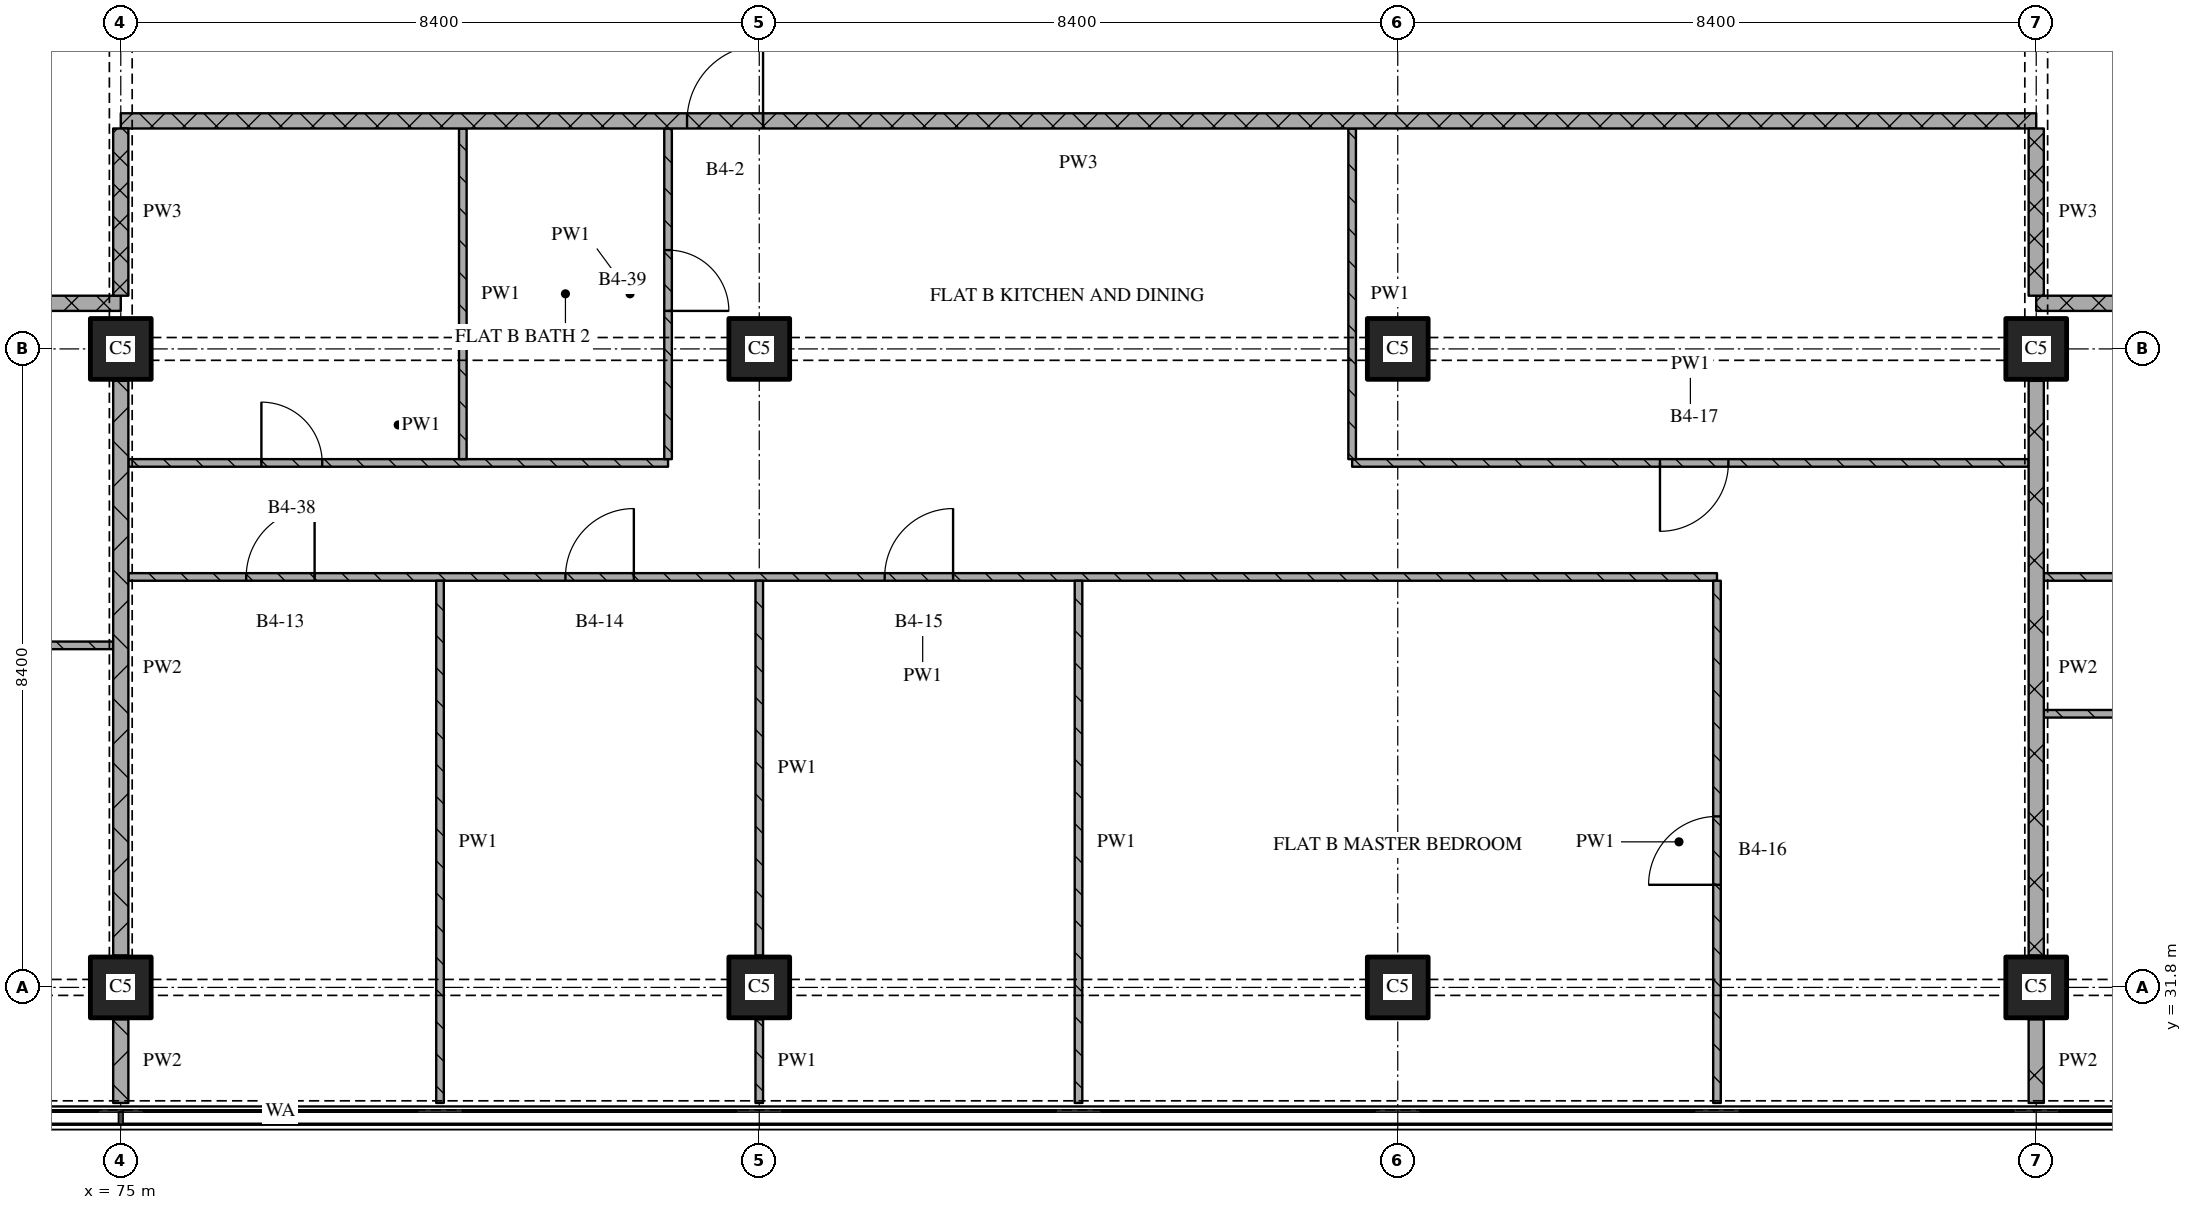
"""IFC4 building model, lengths in metres.
Left out: names, types, materials, properties, quantities, classifications, styles, units other than length and angle.
Written with IfcOpenShell. Run it as: python <this file> out.ifc"""

import sys

from ifc_helpers import new_model, si_unit, direction, frame, frame_2d, origin, origin_2d, place, context, subcontext, project, spatial, rectangle, extrude, element, fill, save


model = new_model("IFC4")
c1 = context("Model", 3, precision=1e-05, world=origin(), true_north=direction((0.0, 1.0)))
c2 = subcontext(c1, "Body", "Model", "MODEL_VIEW")
j1 = project(units=[si_unit("LENGTHUNIT", "METRE"), si_unit("PLANEANGLEUNIT", "RADIAN")], contexts=[c1])
p1 = place(None, origin())
s1 = spatial("IfcSite", under=j1, at=p1, CompositionType="ELEMENT")
p2 = place(p1, origin())
s2 = spatial("IfcBuilding", under=s1, at=p2, CompositionType="ELEMENT")
p3 = place(p2, frame((0.0, 0.0, 134.85)))
s3 = spatial("IfcBuildingStorey", under=s2, at=p3, CompositionType="ELEMENT", Elevation=134.85)
for number, where, z_axis, x_axis in (
    (1, (75.0, 31.8, 0.0), (0.0, 0.0, 1.0), (1.0, 0.0, 0.0)),
    (2, (75.0, 40.2, 0.0), (0.0, 0.0, 1.0), (1.0, 0.0, 0.0)),
    (3, (83.4, 31.8, 0.0), (0.0, 0.0, 1.0), (1.0, 0.0, 0.0)),
    (4, (83.4, 40.2, 0.0), (0.0, 0.0, 1.0), (1.0, 0.0, 0.0)),
    (5, (91.8, 31.8, 0.0), (0.0, 0.0, 1.0), (1.0, 0.0, 0.0)),
    (6, (91.8, 40.2, 0.0), (0.0, 0.0, 1.0), (1.0, 0.0, 0.0)),
    (7, (100.2, 31.8, 0.0), (0.0, 0.0, 1.0), (1.0, 0.0, 0.0)),
    (8, (100.2, 40.2, 0.0), (0.0, 0.0, 1.0), (1.0, 0.0, 0.0)),
):
    element("IfcColumn", number, at=place(p3, frame(where, z_axis=z_axis, x_axis=x_axis)), inside=s3, PredefinedType="COLUMN", context=c2, shape_type="SweptSolid", body=[
        extrude(rectangle(XDim=0.8, YDim=0.8, at=origin_2d()), origin(), (0.0, 0.0, 1.0), 3.6),
    ])
p4 = place(p3, frame((100.3, 35.4, 0.0), z_axis=(0.0, 0.0, 1.0), x_axis=(1.0, 0.0, 0.0)))
e9 = element("IfcWall", 9, at=p4, inside=s3, PredefinedType="PARTITIONING", context=c2, shape_type="SweptSolid", body=[
    extrude(rectangle(XDim=8.3, YDim=0.1, at=frame_2d((4.15, 0.0))), origin(), (0.0, 0.0, 1.0), 3.32),
])
p5 = place(p3, frame((65.7, 36.3, 0.0), z_axis=(0.0, 0.0, 1.0), x_axis=(1.0, 0.0, 0.0)))
e10 = element("IfcWall", 10, at=p5, inside=s3, PredefinedType="PARTITIONING", context=c2, shape_type="SweptSolid", body=[
    extrude(rectangle(XDim=9.2, YDim=0.1, at=frame_2d((4.6, 0.0))), origin(), (0.0, 0.0, 1.0), 3.32),
])
p6 = place(p5, frame((6.5, 0.0, 0.0)))
e11 = element("IfcOpeningElement", 11, at=p6, cuts=e10, PredefinedType="OPENING", context=c2, shape_type="SweptSolid", body=[
    extrude(rectangle(XDim=0.8, YDim=2.1, at=frame_2d((0.4, 1.05))), frame((0.0, 0.06, 0.0), z_axis=(0.0, -1.0, 0.0), x_axis=(1.0, 0.0, 0.0)), (0.0, 0.0, 1.0), 0.12),
])
p7 = place(p3, frame((96.0, 37.2, 0.0), z_axis=(0.0, 0.0, 1.0), x_axis=(-1.0, 0.0, 0.0)))
e12 = element("IfcWall", 12, at=p7, inside=s3, PredefinedType="PARTITIONING", context=c2, shape_type="SweptSolid", body=[
    extrude(rectangle(XDim=20.9, YDim=0.1, at=frame_2d((10.45, 0.0))), origin(), (0.0, 0.0, 1.0), 3.32),
])
p8 = place(p7, frame((10.05, 0.0, 0.0)))
e13 = element("IfcOpeningElement", 13, at=p8, cuts=e12, PredefinedType="OPENING", context=c2, shape_type="SweptSolid", body=[
    extrude(rectangle(XDim=0.9, YDim=2.1, at=frame_2d((0.45, 1.05))), frame((0.0, 0.06, 0.0), z_axis=(0.0, -1.0, 0.0), x_axis=(1.0, 0.0, 0.0)), (0.0, 0.0, 1.0), 0.12),
])
p9 = place(p7, frame((14.25, 0.0, 0.0)))
e14 = element("IfcOpeningElement", 14, at=p9, cuts=e12, PredefinedType="OPENING", context=c2, shape_type="SweptSolid", body=[
    extrude(rectangle(XDim=0.9, YDim=2.1, at=frame_2d((0.45, 1.05))), frame((0.0, 0.06, 0.0), z_axis=(0.0, -1.0, 0.0), x_axis=(1.0, 0.0, 0.0)), (0.0, 0.0, 1.0), 0.12),
])
p10 = place(p7, frame((18.45, 0.0, 0.0)))
e15 = element("IfcOpeningElement", 15, at=p10, cuts=e12, PredefinedType="OPENING", context=c2, shape_type="SweptSolid", body=[
    extrude(rectangle(XDim=0.9, YDim=2.1, at=frame_2d((0.45, 1.05))), frame((0.0, 0.06, 0.0), z_axis=(0.0, -1.0, 0.0), x_axis=(1.0, 0.0, 0.0)), (0.0, 0.0, 1.0), 0.12),
])
p11 = place(p3, frame((100.3, 37.2, 0.0), z_axis=(0.0, 0.0, 1.0), x_axis=(1.0, 0.0, 0.0)))
e16 = element("IfcWall", 16, at=p11, inside=s3, PredefinedType="PARTITIONING", context=c2, shape_type="SweptSolid", body=[
    extrude(rectangle(XDim=11.0, YDim=0.1, at=frame_2d((5.5, 0.0))), origin(), (0.0, 0.0, 1.0), 3.32),
])
p12 = place(p11, frame((1.75, 0.0, 0.0)))
e17 = element("IfcOpeningElement", 17, at=p12, cuts=e16, PredefinedType="OPENING", context=c2, shape_type="SweptSolid", body=[
    extrude(rectangle(XDim=0.8, YDim=2.1, at=frame_2d((0.4, 1.05))), frame((0.0, 0.06, 0.0), z_axis=(0.0, -1.0, 0.0), x_axis=(1.0, 0.0, 0.0)), (0.0, 0.0, 1.0), 0.12),
])
p13 = place(p11, frame((6.25, 0.0, 0.0)))
e18 = element("IfcOpeningElement", 18, at=p13, cuts=e16, PredefinedType="OPENING", context=c2, shape_type="SweptSolid", body=[
    extrude(rectangle(XDim=0.8, YDim=2.1, at=frame_2d((0.4, 1.05))), frame((0.0, 0.06, 0.0), z_axis=(0.0, -1.0, 0.0), x_axis=(1.0, 0.0, 0.0)), (0.0, 0.0, 1.0), 0.12),
])
p14 = place(p3, frame((75.1, 38.7, 0.0), z_axis=(0.0, 0.0, 1.0), x_axis=(1.0, 0.0, 0.0)))
e19 = element("IfcWall", 19, at=p14, inside=s3, PredefinedType="PARTITIONING", context=c2, shape_type="SweptSolid", body=[
    extrude(rectangle(XDim=7.1, YDim=0.1, at=frame_2d((3.55, 0.0))), origin(), (0.0, 0.0, 1.0), 3.32),
])
p15 = place(p14, frame((1.75, 0.0, 0.0)))
e20 = element("IfcOpeningElement", 20, at=p15, cuts=e19, PredefinedType="OPENING", context=c2, shape_type="SweptSolid", body=[
    extrude(rectangle(XDim=0.8, YDim=2.1, at=frame_2d((0.4, 1.05))), frame((0.0, 0.06, 0.0), z_axis=(0.0, -1.0, 0.0), x_axis=(1.0, 0.0, 0.0)), (0.0, 0.0, 1.0), 0.12),
])
p16 = place(p3, frame((91.2, 38.7, 0.0), z_axis=(0.0, 0.0, 1.0), x_axis=(1.0, 0.0, 0.0)))
e21 = element("IfcWall", 21, at=p16, inside=s3, PredefinedType="PARTITIONING", context=c2, shape_type="SweptSolid", body=[
    extrude(rectangle(XDim=8.9, YDim=0.1, at=frame_2d((4.45, 0.0))), origin(), (0.0, 0.0, 1.0), 3.32),
])
p17 = place(p16, frame((4.05, 0.0, 0.0)))
e22 = element("IfcOpeningElement", 22, at=p17, cuts=e21, PredefinedType="OPENING", context=c2, shape_type="SweptSolid", body=[
    extrude(rectangle(XDim=0.9, YDim=2.1, at=frame_2d((0.45, 1.05))), frame((0.0, 0.06, 0.0), z_axis=(0.0, -1.0, 0.0), x_axis=(1.0, 0.0, 0.0)), (0.0, 0.0, 1.0), 0.12),
])
p18 = place(p3, frame((75.0, 40.8, 0.0), z_axis=(0.0, 0.0, 1.0), x_axis=(-1.0, 0.0, 0.0)))
e23 = element("IfcWall", 23, at=p18, inside=s3, PredefinedType="PARTITIONING", context=c2, shape_type="SweptSolid", body=[
    extrude(rectangle(XDim=24.18, YDim=0.2, at=frame_2d((12.09, 0.0))), origin(), (0.0, 0.0, 1.0), 3.32),
])
p19 = place(p18, frame((9.55, 0.0, 0.0)))
e24 = element("IfcOpeningElement", 24, at=p19, cuts=e23, PredefinedType="OPENING", context=c2, shape_type="SweptSolid", body=[
    extrude(rectangle(XDim=1.0, YDim=2.1, at=frame_2d((0.5, 1.05))), frame((0.0, 0.11, 0.0), z_axis=(0.0, -1.0, 0.0), x_axis=(1.0, 0.0, 0.0)), (0.0, 0.0, 1.0), 0.22),
])
p20 = place(p3, frame((124.38, 40.8, 0.0), z_axis=(0.0, 0.0, 1.0), x_axis=(-1.0, 0.0, 0.0)))
e25 = element("IfcWall", 25, at=p20, inside=s3, PredefinedType="PARTITIONING", context=c2, shape_type="SweptSolid", body=[
    extrude(rectangle(XDim=24.18, YDim=0.2, at=frame_2d((12.09, 0.0))), origin(), (0.0, 0.0, 1.0), 3.32),
])
p21 = place(p20, frame((11.83, 0.0, 0.0)))
e26 = element("IfcOpeningElement", 26, at=p21, cuts=e25, PredefinedType="OPENING", context=c2, shape_type="SweptSolid", body=[
    extrude(rectangle(XDim=1.0, YDim=2.1, at=frame_2d((0.5, 1.05))), frame((0.0, 0.11, 0.0), z_axis=(0.0, -1.0, 0.0), x_axis=(1.0, 0.0, 0.0)), (0.0, 0.0, 1.0), 0.22),
])
p22 = place(p3, frame((100.2, 43.2, 0.0), z_axis=(0.0, 0.0, 1.0), x_axis=(-1.0, 0.0, 0.0)))
e27 = element("IfcWall", 27, at=p22, inside=s3, PredefinedType="PARTITIONING", context=c2, shape_type="SweptSolid", body=[
    extrude(rectangle(XDim=25.2, YDim=0.2, at=frame_2d((12.6, 0.0))), origin(), (0.0, 0.0, 1.0), 3.32),
])
p23 = place(p22, frame((16.75, 0.0, 0.0)))
e28 = element("IfcOpeningElement", 28, at=p23, cuts=e27, PredefinedType="OPENING", context=c2, shape_type="SweptSolid", body=[
    extrude(rectangle(XDim=1.0, YDim=2.1, at=frame_2d((0.5, 1.05))), frame((0.0, 0.11, 0.0), z_axis=(0.0, -1.0, 0.0), x_axis=(1.0, 0.0, 0.0)), (0.0, 0.0, 1.0), 0.22),
])
p24 = place(p3, frame((75.0, 43.1, 0.0), z_axis=(0.0, 0.0, 1.0), x_axis=(0.0, -1.0, 0.0)))
e29 = element("IfcWall", 29, at=p24, inside=s3, PredefinedType="PARTITIONING", context=c2, shape_type="SweptSolid", body=[
    extrude(rectangle(XDim=2.2, YDim=0.2, at=frame_2d((1.1, 0.0))), origin(), (0.0, 0.0, 1.0), 2.43),
])
p25 = place(p3, frame((75.0, 31.38, 0.0), z_axis=(0.0, 0.0, 1.0), x_axis=(0.0, -1.0, 0.0)))
e30 = element("IfcWall", 30, at=p25, inside=s3, PredefinedType="PARTITIONING", context=c2, shape_type="SweptSolid", body=[
    extrude(rectangle(XDim=1.1, YDim=0.2, at=frame_2d((0.55, 0.0))), origin(), (0.0, 0.0, 1.0), 3.32),
])
p26 = place(p3, frame((75.0, 39.78, 0.0), z_axis=(0.0, 0.0, 1.0), x_axis=(0.0, -1.0, 0.0)))
e31 = element("IfcWall", 31, at=p26, inside=s3, PredefinedType="PARTITIONING", context=c2, shape_type="SweptSolid", body=[
    extrude(rectangle(XDim=7.56, YDim=0.2, at=frame_2d((3.78, 0.0))), origin(), (0.0, 0.0, 1.0), 2.83),
])
p27 = place(p3, frame((79.2, 37.15, 0.0), z_axis=(0.0, 0.0, 1.0), x_axis=(0.0, -1.0, 0.0)))
e32 = element("IfcWall", 32, at=p27, inside=s3, PredefinedType="PARTITIONING", context=c2, shape_type="SweptSolid", body=[
    extrude(rectangle(XDim=6.87, YDim=0.1, at=frame_2d((3.435, 0.0))), origin(), (0.0, 0.0, 1.0), 3.32),
])
p28 = place(p3, frame((79.5, 43.1, 0.0), z_axis=(0.0, 0.0, 1.0), x_axis=(0.0, -1.0, 0.0)))
e33 = element("IfcWall", 33, at=p28, inside=s3, PredefinedType="PARTITIONING", context=c2, shape_type="SweptSolid", body=[
    extrude(rectangle(XDim=4.35, YDim=0.1, at=frame_2d((2.175, 0.0))), origin(), (0.0, 0.0, 1.0), 3.32),
])
p29 = place(p3, frame((82.2, 38.75, 0.0), z_axis=(0.0, 0.0, 1.0), x_axis=(0.0, 1.0, 0.0)))
e34 = element("IfcWall", 34, at=p29, inside=s3, PredefinedType="PARTITIONING", context=c2, shape_type="SweptSolid", body=[
    extrude(rectangle(XDim=4.35, YDim=0.1, at=frame_2d((2.175, 0.0))), origin(), (0.0, 0.0, 1.0), 3.32),
])
p30 = place(p29, frame((1.95, 0.0, 0.0)))
e35 = element("IfcOpeningElement", 35, at=p30, cuts=e34, PredefinedType="OPENING", context=c2, shape_type="SweptSolid", body=[
    extrude(rectangle(XDim=0.8, YDim=2.1, at=frame_2d((0.4, 1.05))), frame((0.0, 0.06, 0.0), z_axis=(0.0, -1.0, 0.0), x_axis=(1.0, 0.0, 0.0)), (0.0, 0.0, 1.0), 0.12),
])
p31 = place(p3, frame((83.4, 31.38, 0.0), z_axis=(0.0, 0.0, 1.0), x_axis=(0.0, -1.0, 0.0)))
e36 = element("IfcWall", 36, at=p31, inside=s3, PredefinedType="PARTITIONING", context=c2, shape_type="SweptSolid", body=[
    extrude(rectangle(XDim=1.1, YDim=0.1, at=frame_2d((0.55, 0.0))), origin(), (0.0, 0.0, 1.0), 2.72),
])
p32 = place(p3, frame((83.4, 37.15, 0.0), z_axis=(0.0, 0.0, 1.0), x_axis=(0.0, -1.0, 0.0)))
e37 = element("IfcWall", 37, at=p32, inside=s3, PredefinedType="PARTITIONING", context=c2, shape_type="SweptSolid", body=[
    extrude(rectangle(XDim=4.93, YDim=0.1, at=frame_2d((2.465, 0.0))), origin(), (0.0, 0.0, 1.0), 3.32),
])
p33 = place(p3, frame((87.6, 37.15, 0.0), z_axis=(0.0, 0.0, 1.0), x_axis=(0.0, -1.0, 0.0)))
e38 = element("IfcWall", 38, at=p33, inside=s3, PredefinedType="PARTITIONING", context=c2, shape_type="SweptSolid", body=[
    extrude(rectangle(XDim=6.87, YDim=0.1, at=frame_2d((3.435, 0.0))), origin(), (0.0, 0.0, 1.0), 3.32),
])
p34 = place(p3, frame((91.2, 43.1, 0.0), z_axis=(0.0, 0.0, 1.0), x_axis=(0.0, -1.0, 0.0)))
e39 = element("IfcWall", 39, at=p34, inside=s3, PredefinedType="PARTITIONING", context=c2, shape_type="SweptSolid", body=[
    extrude(rectangle(XDim=4.35, YDim=0.1, at=frame_2d((2.175, 0.0))), origin(), (0.0, 0.0, 1.0), 3.32),
])
p35 = place(p3, frame((96.0, 30.28, 0.0), z_axis=(0.0, 0.0, 1.0), x_axis=(0.0, 1.0, 0.0)))
e40 = element("IfcWall", 40, at=p35, inside=s3, PredefinedType="PARTITIONING", context=c2, shape_type="SweptSolid", body=[
    extrude(rectangle(XDim=6.87, YDim=0.1, at=frame_2d((3.435, 0.0))), origin(), (0.0, 0.0, 1.0), 3.32),
])
p36 = place(p35, frame((2.87, 0.0, 0.0)))
e41 = element("IfcOpeningElement", 41, at=p36, cuts=e40, PredefinedType="OPENING", context=c2, shape_type="SweptSolid", body=[
    extrude(rectangle(XDim=0.9, YDim=2.1, at=frame_2d((0.45, 1.05))), frame((0.0, 0.06, 0.0), z_axis=(0.0, -1.0, 0.0), x_axis=(1.0, 0.0, 0.0)), (0.0, 0.0, 1.0), 0.12),
])
p37 = place(p3, frame((100.2, 43.1, 0.0), z_axis=(0.0, 0.0, 1.0), x_axis=(0.0, -1.0, 0.0)))
e42 = element("IfcWall", 42, at=p37, inside=s3, PredefinedType="PARTITIONING", context=c2, shape_type="SweptSolid", body=[
    extrude(rectangle(XDim=2.2, YDim=0.2, at=frame_2d((1.1, 0.0))), origin(), (0.0, 0.0, 1.0), 2.43),
])
p38 = place(p3, frame((100.2, 31.38, 0.0), z_axis=(0.0, 0.0, 1.0), x_axis=(0.0, -1.0, 0.0)))
e43 = element("IfcWall", 43, at=p38, inside=s3, PredefinedType="PARTITIONING", context=c2, shape_type="SweptSolid", body=[
    extrude(rectangle(XDim=1.1, YDim=0.2, at=frame_2d((0.55, 0.0))), origin(), (0.0, 0.0, 1.0), 3.32),
])
p39 = place(p3, frame((100.2, 39.78, 0.0), z_axis=(0.0, 0.0, 1.0), x_axis=(0.0, -1.0, 0.0)))
e44 = element("IfcWall", 44, at=p39, inside=s3, PredefinedType="PARTITIONING", context=c2, shape_type="SweptSolid", body=[
    extrude(rectangle(XDim=7.56, YDim=0.2, at=frame_2d((3.78, 0.0))), origin(), (0.0, 0.0, 1.0), 2.83),
])
p40 = place(p8, origin())
e45 = element("IfcDoor", 45, at=p40, inside=s3, OperationType="SINGLE_SWING_RIGHT", PredefinedType="DOOR", context=c2, shape_type="SweptSolid", body=[
    extrude(rectangle(XDim=0.9, YDim=2.1, at=frame_2d((0.45, 1.05))), frame((0.0, 0.025, 0.0), z_axis=(0.0, -1.0, 0.0), x_axis=(1.0, 0.0, 0.0)), (0.0, 0.0, 1.0), 0.05),
])
fill(e13, e45)
p41 = place(p9, origin())
e46 = element("IfcDoor", 46, at=p41, inside=s3, OperationType="SINGLE_SWING_RIGHT", PredefinedType="DOOR", context=c2, shape_type="SweptSolid", body=[
    extrude(rectangle(XDim=0.9, YDim=2.1, at=frame_2d((0.45, 1.05))), frame((0.0, 0.025, 0.0), z_axis=(0.0, -1.0, 0.0), x_axis=(1.0, 0.0, 0.0)), (0.0, 0.0, 1.0), 0.05),
])
fill(e14, e46)
p42 = place(p10, origin())
e47 = element("IfcDoor", 47, at=p42, inside=s3, OperationType="SINGLE_SWING_RIGHT", PredefinedType="DOOR", context=c2, shape_type="SweptSolid", body=[
    extrude(rectangle(XDim=0.9, YDim=2.1, at=frame_2d((0.45, 1.05))), frame((0.0, 0.025, 0.0), z_axis=(0.0, -1.0, 0.0), x_axis=(1.0, 0.0, 0.0)), (0.0, 0.0, 1.0), 0.05),
])
fill(e15, e47)
p43 = place(p15, origin())
e48 = element("IfcDoor", 48, at=p43, inside=s3, OperationType="SINGLE_SWING_LEFT", PredefinedType="DOOR", context=c2, shape_type="SweptSolid", body=[
    extrude(rectangle(XDim=0.8, YDim=2.1, at=frame_2d((0.4, 1.05))), frame((0.0, 0.025, 0.0), z_axis=(0.0, -1.0, 0.0), x_axis=(1.0, 0.0, 0.0)), (0.0, 0.0, 1.0), 0.05),
])
fill(e20, e48)
p44 = place(p17, origin())
e49 = element("IfcDoor", 49, at=p44, inside=s3, OperationType="SINGLE_SWING_RIGHT", PredefinedType="DOOR", context=c2, shape_type="SweptSolid", body=[
    extrude(rectangle(XDim=0.9, YDim=2.1, at=frame_2d((0.45, 1.05))), frame((0.0, 0.025, 0.0), z_axis=(0.0, -1.0, 0.0), x_axis=(1.0, 0.0, 0.0)), (0.0, 0.0, 1.0), 0.05),
])
fill(e22, e49)
p45 = place(p23, origin())
e50 = element("IfcDoor", 50, at=p45, inside=s3, OperationType="SINGLE_SWING_RIGHT", PredefinedType="DOOR", context=c2, shape_type="SweptSolid", body=[
    extrude(rectangle(XDim=1.0, YDim=2.1, at=frame_2d((0.5, 1.05))), frame((0.0, 0.025, 0.0), z_axis=(0.0, -1.0, 0.0), x_axis=(1.0, 0.0, 0.0)), (0.0, 0.0, 1.0), 0.05),
])
fill(e28, e50)
p46 = place(p30, origin())
e51 = element("IfcDoor", 51, at=p46, inside=s3, OperationType="SINGLE_SWING_RIGHT", PredefinedType="DOOR", context=c2, shape_type="SweptSolid", body=[
    extrude(rectangle(XDim=0.8, YDim=2.1, at=frame_2d((0.4, 1.05))), frame((0.0, 0.025, 0.0), z_axis=(0.0, -1.0, 0.0), x_axis=(1.0, 0.0, 0.0)), (0.0, 0.0, 1.0), 0.05),
])
fill(e35, e51)
p47 = place(p36, origin())
e52 = element("IfcDoor", 52, at=p47, inside=s3, OperationType="SINGLE_SWING_LEFT", PredefinedType="DOOR", context=c2, shape_type="SweptSolid", body=[
    extrude(rectangle(XDim=0.9, YDim=2.1, at=frame_2d((0.45, 1.05))), frame((0.0, 0.025, 0.0), z_axis=(0.0, -1.0, 0.0), x_axis=(1.0, 0.0, 0.0)), (0.0, 0.0, 1.0), 0.05),
])
fill(e41, e52)
save(model, sys.argv[1])
